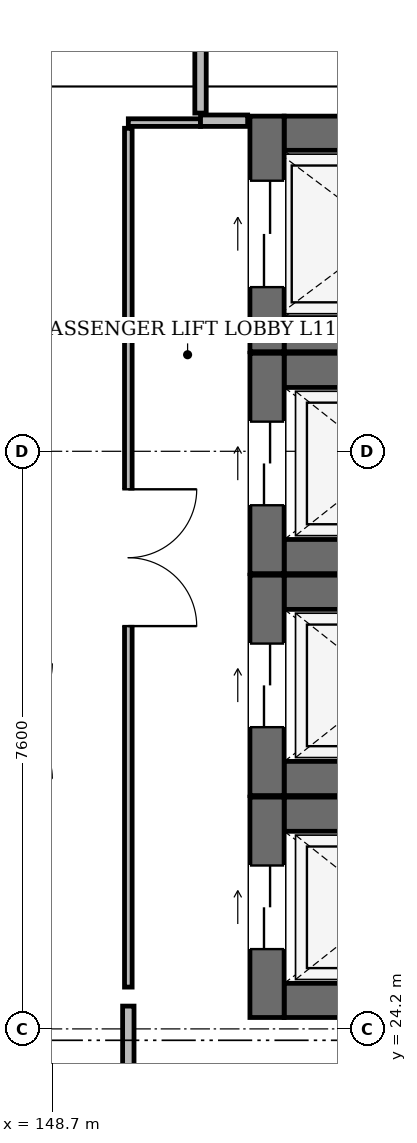
"""IFC4 building model, lengths in metres.
Left out: names, types, materials, properties, quantities, classifications, styles, units other than length and angle.
Written with IfcOpenShell. Run it as: python <this file> out.ifc"""

import sys

from ifc_helpers import new_model, si_unit, direction, frame, frame_2d, origin, place, context, subcontext, project, spatial, rectangle, extrude, element, fill, save


model = new_model("IFC4")
c1 = context("Model", 3, precision=1e-05, world=origin(), true_north=direction((0.0, 1.0)))
c2 = subcontext(c1, "Body", "Model", "MODEL_VIEW")
j1 = project(units=[si_unit("LENGTHUNIT", "METRE"), si_unit("PLANEANGLEUNIT", "RADIAN")], contexts=[c1])
p1 = place(None, origin())
s1 = spatial("IfcSite", under=j1, at=p1, CompositionType="ELEMENT")
p2 = place(p1, origin())
s2 = spatial("IfcBuilding", under=s1, at=p2, CompositionType="ELEMENT")
p3 = place(p2, frame((0.0, 0.0, 49.2)))
s3 = spatial("IfcBuildingStorey", under=s2, at=p3, CompositionType="ELEMENT", Elevation=49.2)
for number, where, z_axis, x_axis in (
    (1, (151.75, 24.575, 0.0), (0.0, 0.0, 1.0), (1.0, 0.0, 0.0)),
    (2, (151.75, 27.025, 0.0), (0.0, 0.0, 1.0), (1.0, 0.0, 0.0)),
):
    element("IfcWall", number, at=place(p3, frame(where, z_axis=z_axis, x_axis=x_axis)), inside=s3, PredefinedType="SHEAR", context=c2, shape_type="SweptSolid", body=[
        extrude(rectangle(XDim=2.7, YDim=0.45, at=frame_2d((1.35, 0.0))), origin(), (0.0, 0.0, 1.0), 3.9),
    ])
p4 = place(p3, frame((151.525, 24.35, 0.0), z_axis=(0.0, 0.0, 1.0), x_axis=(0.0, 1.0, 0.0)))
e3 = element("IfcWall", 3, at=p4, inside=s3, PredefinedType="SHEAR", context=c2, shape_type="SweptSolid", body=[
    extrude(rectangle(XDim=2.9, YDim=0.45, at=frame_2d((1.45, 0.0))), origin(), (0.0, 0.0, 1.0), 3.9),
])
p5 = place(p4, frame((0.9, 0.0, 0.0)))
e4 = element("IfcOpeningElement", 4, at=p5, cuts=e3, PredefinedType="OPENING", context=c2, shape_type="SweptSolid", body=[
    extrude(rectangle(XDim=1.1, YDim=2.2, at=frame_2d((0.55, 1.1))), frame((0.0, 0.237, 0.0), z_axis=(0.0, -1.0, 0.0), x_axis=(1.0, 0.0, 0.0)), (0.0, 0.0, 1.0), 0.474),
])
for number, where, z_axis, x_axis in (
    (5, (151.75, 27.495, 0.0), (0.0, 0.0, 1.0), (1.0, 0.0, 0.0)),
    (6, (151.75, 29.945, 0.0), (0.0, 0.0, 1.0), (1.0, 0.0, 0.0)),
):
    element("IfcWall", number, at=place(p3, frame(where, z_axis=z_axis, x_axis=x_axis)), inside=s3, PredefinedType="SHEAR", context=c2, shape_type="SweptSolid", body=[
        extrude(rectangle(XDim=2.7, YDim=0.45, at=frame_2d((1.35, 0.0))), origin(), (0.0, 0.0, 1.0), 3.9),
    ])
p6 = place(p3, frame((151.525, 27.27, 0.0), z_axis=(0.0, 0.0, 1.0), x_axis=(0.0, 1.0, 0.0)))
e7 = element("IfcWall", 7, at=p6, inside=s3, PredefinedType="SHEAR", context=c2, shape_type="SweptSolid", body=[
    extrude(rectangle(XDim=2.9, YDim=0.45, at=frame_2d((1.45, 0.0))), origin(), (0.0, 0.0, 1.0), 3.9),
])
p7 = place(p6, frame((0.9, 0.0, 0.0)))
e8 = element("IfcOpeningElement", 8, at=p7, cuts=e7, PredefinedType="OPENING", context=c2, shape_type="SweptSolid", body=[
    extrude(rectangle(XDim=1.1, YDim=2.2, at=frame_2d((0.55, 1.1))), frame((0.0, 0.237, 0.0), z_axis=(0.0, -1.0, 0.0), x_axis=(1.0, 0.0, 0.0)), (0.0, 0.0, 1.0), 0.474),
])
for number, where, z_axis, x_axis in (
    (9, (151.75, 30.415, 0.0), (0.0, 0.0, 1.0), (1.0, 0.0, 0.0)),
    (10, (151.75, 32.865, 0.0), (0.0, 0.0, 1.0), (1.0, 0.0, 0.0)),
):
    element("IfcWall", number, at=place(p3, frame(where, z_axis=z_axis, x_axis=x_axis)), inside=s3, PredefinedType="SHEAR", context=c2, shape_type="SweptSolid", body=[
        extrude(rectangle(XDim=2.7, YDim=0.45, at=frame_2d((1.35, 0.0))), origin(), (0.0, 0.0, 1.0), 3.9),
    ])
p8 = place(p3, frame((151.525, 30.19, 0.0), z_axis=(0.0, 0.0, 1.0), x_axis=(0.0, 1.0, 0.0)))
e11 = element("IfcWall", 11, at=p8, inside=s3, PredefinedType="SHEAR", context=c2, shape_type="SweptSolid", body=[
    extrude(rectangle(XDim=2.9, YDim=0.45, at=frame_2d((1.45, 0.0))), origin(), (0.0, 0.0, 1.0), 3.9),
])
p9 = place(p8, frame((0.9, 0.0, 0.0)))
e12 = element("IfcOpeningElement", 12, at=p9, cuts=e11, PredefinedType="OPENING", context=c2, shape_type="SweptSolid", body=[
    extrude(rectangle(XDim=1.1, YDim=2.2, at=frame_2d((0.55, 1.1))), frame((0.0, 0.237, 0.0), z_axis=(0.0, -1.0, 0.0), x_axis=(1.0, 0.0, 0.0)), (0.0, 0.0, 1.0), 0.474),
])
for number, where, z_axis, x_axis in (
    (13, (151.75, 33.335, 0.0), (0.0, 0.0, 1.0), (1.0, 0.0, 0.0)),
    (14, (151.75, 35.985, 0.0), (0.0, 0.0, 1.0), (1.0, 0.0, 0.0)),
):
    element("IfcWall", number, at=place(p3, frame(where, z_axis=z_axis, x_axis=x_axis)), inside=s3, PredefinedType="SHEAR", context=c2, shape_type="SweptSolid", body=[
        extrude(rectangle(XDim=2.7, YDim=0.45, at=frame_2d((1.35, 0.0))), origin(), (0.0, 0.0, 1.0), 3.9),
    ])
p10 = place(p3, frame((151.525, 33.11, 0.0), z_axis=(0.0, 0.0, 1.0), x_axis=(0.0, 1.0, 0.0)))
e15 = element("IfcWall", 15, at=p10, inside=s3, PredefinedType="SHEAR", context=c2, shape_type="SweptSolid", body=[
    extrude(rectangle(XDim=3.1, YDim=0.45, at=frame_2d((1.55, 0.0))), origin(), (0.0, 0.0, 1.0), 3.9),
])
p11 = place(p10, frame((0.85, 0.0, 0.0)))
e16 = element("IfcOpeningElement", 16, at=p11, cuts=e15, PredefinedType="OPENING", context=c2, shape_type="SweptSolid", body=[
    extrude(rectangle(XDim=1.4, YDim=2.3, at=frame_2d((0.7, 1.15))), frame((0.0, 0.237, 0.0), z_axis=(0.0, -1.0, 0.0), x_axis=(1.0, 0.0, 0.0)), (0.0, 0.0, 1.0), 0.474),
])
p12 = place(p3, frame((149.7, 24.75, 0.0), z_axis=(0.0, 0.0, 1.0), x_axis=(0.0, 1.0, 0.0)))
e17 = element("IfcWall", 17, at=p12, inside=s3, PredefinedType="PARTITIONING", context=c2, shape_type="SweptSolid", body=[
    extrude(rectangle(XDim=11.3, YDim=0.1, at=frame_2d((5.65, 0.0))), origin(), (0.0, 0.0, 1.0), 3.805),
])
p13 = place(p12, frame((4.75, 0.0, 0.0)))
e18 = element("IfcOpeningElement", 18, at=p13, cuts=e17, PredefinedType="OPENING", context=c2, shape_type="SweptSolid", body=[
    extrude(rectangle(XDim=1.8, YDim=2.4, at=frame_2d((0.9, 1.2))), frame((0.0, 0.062, 0.0), z_axis=(0.0, -1.0, 0.0), x_axis=(1.0, 0.0, 0.0)), (0.0, 0.0, 1.0), 0.124),
])
p14 = place(p3, frame((149.7, 36.125, 0.0), z_axis=(0.0, 0.0, 1.0), x_axis=(1.0, 0.0, 0.0)))
e19 = element("IfcWall", 19, at=p14, inside=s3, PredefinedType="PARTITIONING", context=c2, shape_type="SweptSolid", body=[
    extrude(rectangle(XDim=0.95, YDim=0.1, at=frame_2d((0.475, 0.0))), origin(), (0.0, 0.0, 1.0), 3.805),
])
p15 = place(p3, frame((150.65, 36.15, 0.0), z_axis=(0.0, 0.0, 1.0), x_axis=(1.0, 0.0, 0.0)))
e20 = element("IfcWall", 20, at=p15, inside=s3, PredefinedType="PARTITIONING", context=c2, shape_type="SweptSolid", body=[
    extrude(rectangle(XDim=0.62, YDim=0.15, at=frame_2d((0.31, 0.0))), origin(), (0.0, 0.0, 1.0), 3.805),
])
p16 = place(p3, frame((149.7, 24.5, 0.0), z_axis=(0.0, 0.0, 1.0), x_axis=(0.0, -1.0, 0.0)))
e21 = element("IfcWall", 21, at=p16, inside=s3, PredefinedType="PARTITIONING", context=c2, shape_type="SweptSolid", body=[
    extrude(rectangle(XDim=0.8, YDim=0.15, at=frame_2d((0.4, 0.0))), origin(), (0.0, 0.0, 1.0), 3.805),
])
p17 = place(p3, frame((150.65, 62.2, 0.0), z_axis=(0.0, 0.0, 1.0), x_axis=(0.0, -1.0, 0.0)))
e22 = element("IfcWall", 22, at=p17, inside=s3, PredefinedType="PARTITIONING", context=c2, shape_type="SweptSolid", body=[
    extrude(rectangle(XDim=25.95, YDim=0.15, at=frame_2d((12.975, 0.0))), origin(), (0.0, 0.0, 1.0), 3.805),
])
p18 = place(p17, frame((12.275, 0.0, 0.0)))
e23 = element("IfcOpeningElement", 23, at=p18, cuts=e22, PredefinedType="OPENING", context=c2, shape_type="SweptSolid", body=[
    extrude(rectangle(XDim=1.4, YDim=2.2, at=frame_2d((0.7, 1.1))), frame((0.0, 0.087, 0.0), z_axis=(0.0, -1.0, 0.0), x_axis=(1.0, 0.0, 0.0)), (0.0, 0.0, 1.0), 0.174),
])
p19 = place(p5, origin())
e24 = element("IfcDoor", 24, at=p19, inside=s3, OperationType="DOUBLE_DOOR_SLIDING", PredefinedType="DOOR", context=c2, shape_type="SweptSolid", body=[
    extrude(rectangle(XDim=1.1, YDim=2.2, at=frame_2d((0.55, 1.1))), frame((0.0, 0.025, 0.0), z_axis=(0.0, -1.0, 0.0), x_axis=(1.0, 0.0, 0.0)), (0.0, 0.0, 1.0), 0.05),
])
fill(e4, e24)
p20 = place(p7, origin())
e25 = element("IfcDoor", 25, at=p20, inside=s3, OperationType="DOUBLE_DOOR_SLIDING", PredefinedType="DOOR", context=c2, shape_type="SweptSolid", body=[
    extrude(rectangle(XDim=1.1, YDim=2.2, at=frame_2d((0.55, 1.1))), frame((0.0, 0.025, 0.0), z_axis=(0.0, -1.0, 0.0), x_axis=(1.0, 0.0, 0.0)), (0.0, 0.0, 1.0), 0.05),
])
fill(e8, e25)
p21 = place(p9, origin())
e26 = element("IfcDoor", 26, at=p21, inside=s3, OperationType="DOUBLE_DOOR_SLIDING", PredefinedType="DOOR", context=c2, shape_type="SweptSolid", body=[
    extrude(rectangle(XDim=1.1, YDim=2.2, at=frame_2d((0.55, 1.1))), frame((0.0, 0.025, 0.0), z_axis=(0.0, -1.0, 0.0), x_axis=(1.0, 0.0, 0.0)), (0.0, 0.0, 1.0), 0.05),
])
fill(e12, e26)
p22 = place(p11, origin())
e27 = element("IfcDoor", 27, at=p22, inside=s3, OperationType="DOUBLE_DOOR_SLIDING", PredefinedType="DOOR", context=c2, shape_type="SweptSolid", body=[
    extrude(rectangle(XDim=1.4, YDim=2.3, at=frame_2d((0.7, 1.15))), frame((0.0, 0.025, 0.0), z_axis=(0.0, -1.0, 0.0), x_axis=(1.0, 0.0, 0.0)), (0.0, 0.0, 1.0), 0.05),
])
fill(e16, e27)
p23 = place(p13, frame((1.8, 0.0, 0.0), z_axis=(0.0, 0.0, 1.0), x_axis=(-1.0, 0.0, 0.0)))
e28 = element("IfcDoor", 28, at=p23, inside=s3, OperationType="DOUBLE_DOOR_SINGLE_SWING", PredefinedType="DOOR", context=c2, shape_type="SweptSolid", body=[
    extrude(rectangle(XDim=1.8, YDim=2.4, at=frame_2d((0.9, 1.2))), frame((0.0, 0.025, 0.0), z_axis=(0.0, -1.0, 0.0), x_axis=(1.0, 0.0, 0.0)), (0.0, 0.0, 1.0), 0.05),
])
fill(e18, e28)
save(model, sys.argv[1])
